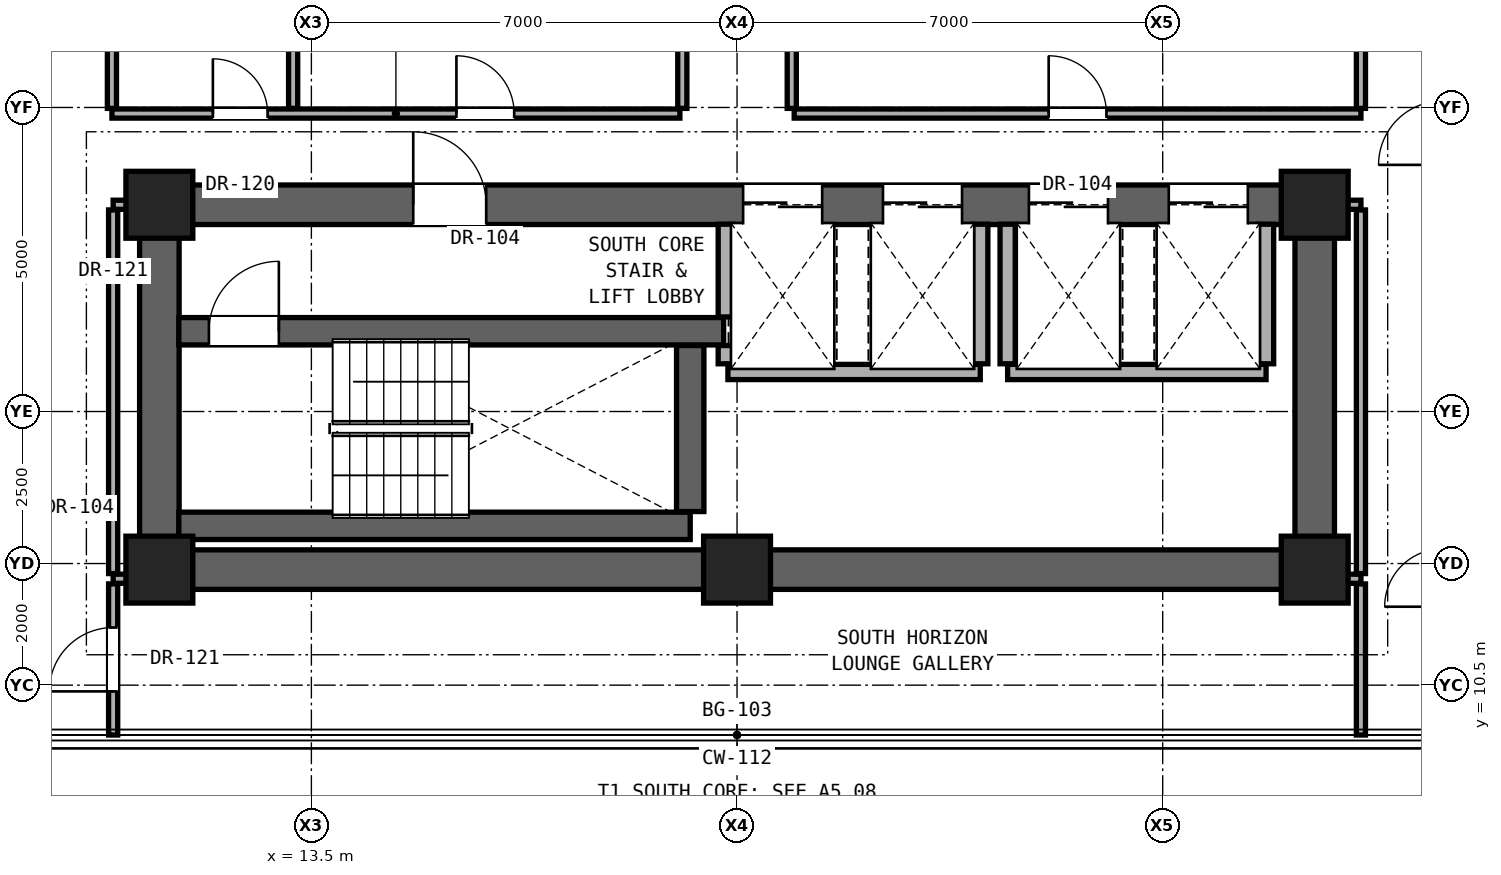
"""IFC4 building model, lengths in metres.
Left out: names, types, materials, properties, quantities, classifications, styles, units other than length and angle.
Written with IfcOpenShell. Run it as: python <this file> out.ifc"""

import sys

from ifc_helpers import new_model, si_unit, direction, frame, frame_2d, origin, origin_2d, place, context, subcontext, project, spatial, rectangle, extrude, element, fill, save


model = new_model("IFC4")
c1 = context("Model", 3, precision=1e-05, world=origin(), true_north=direction((0.0, 1.0)))
c2 = subcontext(c1, "Body", "Model", "MODEL_VIEW")
j1 = project(units=[si_unit("LENGTHUNIT", "METRE"), si_unit("PLANEANGLEUNIT", "RADIAN")], contexts=[c1])
p1 = place(None, origin())
s1 = spatial("IfcSite", under=j1, at=p1, CompositionType="ELEMENT")
p2 = place(p1, origin())
s2 = spatial("IfcBuilding", under=s1, at=p2, CompositionType="ELEMENT")
p3 = place(p2, frame((0.0, 0.0, 118.1)))
s3 = spatial("IfcBuildingStorey", under=s2, at=p3, CompositionType="ELEMENT", Elevation=118.1)
for number, where, z_axis, x_axis in (
    (1, (11.0, 12.4, 0.0), (0.0, 0.0, 1.0), (1.0, 0.0, 0.0)),
    (2, (20.5, 12.4, 0.0), (0.0, 0.0, 1.0), (1.0, 0.0, 0.0)),
    (3, (30.0, 12.4, 0.0), (0.0, 0.0, 1.0), (1.0, 0.0, 0.0)),
    (4, (11.0, 18.4, 0.0), (0.0, 0.0, 1.0), (1.0, 0.0, 0.0)),
    (5, (30.0, 18.4, 0.0), (0.0, 0.0, 1.0), (1.0, 0.0, 0.0)),
):
    element("IfcColumn", number, at=place(p3, frame(where, z_axis=z_axis, x_axis=x_axis)), inside=s3, PredefinedType="COLUMN", context=c2, shape_type="SweptSolid", body=[
        extrude(rectangle(XDim=1.1, YDim=1.1, at=origin_2d()), origin(), (0.0, 0.0, 1.0), 3.3),
    ])
p4 = place(p3, frame((11.0, 12.4, 0.0), z_axis=(0.0, 0.0, 1.0), x_axis=(1.0, 0.0, 0.0)))
e6 = element("IfcWall", 6, at=p4, inside=s3, PredefinedType="SHEAR", context=c2, shape_type="SweptSolid", body=[
    extrude(rectangle(XDim=19.0, YDim=0.65, at=frame_2d((9.5, 0.0))), origin(), (0.0, 0.0, 1.0), 3.08),
])
for number, where, z_axis, x_axis in (
    (7, (11.0, 12.4, 0.0), (0.0, 0.0, 1.0), (0.0, 1.0, 0.0)),
    (8, (30.0, 12.4, 0.0), (0.0, 0.0, 1.0), (0.0, 1.0, 0.0)),
):
    element("IfcWall", number, at=place(p3, frame(where, z_axis=z_axis, x_axis=x_axis)), inside=s3, PredefinedType="SHEAR", context=c2, shape_type="SweptSolid", body=[
        extrude(rectangle(XDim=6.0, YDim=0.65, at=frame_2d((3.0, 0.0))), origin(), (0.0, 0.0, 1.0), 3.08),
    ])
p5 = place(p3, frame((11.0, 18.4, 0.0), z_axis=(0.0, 0.0, 1.0), x_axis=(1.0, 0.0, 0.0)))
e9 = element("IfcWall", 9, at=p5, inside=s3, PredefinedType="SHEAR", context=c2, shape_type="SweptSolid", body=[
    extrude(rectangle(XDim=19.0, YDim=0.65, at=frame_2d((9.5, 0.0))), origin(), (0.0, 0.0, 1.0), 3.08),
])
p6 = place(p5, frame((4.175, 0.0, 0.0)))
e10 = element("IfcOpeningElement", 10, at=p6, cuts=e9, PredefinedType="OPENING", context=c2, shape_type="SweptSolid", body=[
    extrude(rectangle(XDim=1.2, YDim=2.25, at=frame_2d((0.6, 1.125))), frame((0.0, 0.335, 0.0), z_axis=(0.0, -1.0, 0.0), x_axis=(1.0, 0.0, 0.0)), (0.0, 0.0, 1.0), 0.67),
])
p7 = place(p5, frame((9.6, 0.0, 0.0)))
e11 = element("IfcOpeningElement", 11, at=p7, cuts=e9, PredefinedType="OPENING", context=c2, shape_type="SweptSolid", body=[
    extrude(rectangle(XDim=1.3, YDim=2.3, at=frame_2d((0.65, 1.15))), frame((0.0, 0.335, 0.0), z_axis=(0.0, -1.0, 0.0), x_axis=(1.0, 0.0, 0.0)), (0.0, 0.0, 1.0), 0.67),
])
p8 = place(p5, frame((11.9, 0.0, 0.0)))
e12 = element("IfcOpeningElement", 12, at=p8, cuts=e9, PredefinedType="OPENING", context=c2, shape_type="SweptSolid", body=[
    extrude(rectangle(XDim=1.3, YDim=2.3, at=frame_2d((0.65, 1.15))), frame((0.0, 0.335, 0.0), z_axis=(0.0, -1.0, 0.0), x_axis=(1.0, 0.0, 0.0)), (0.0, 0.0, 1.0), 0.67),
])
p9 = place(p5, frame((14.3, 0.0, 0.0)))
e13 = element("IfcOpeningElement", 13, at=p9, cuts=e9, PredefinedType="OPENING", context=c2, shape_type="SweptSolid", body=[
    extrude(rectangle(XDim=1.3, YDim=2.3, at=frame_2d((0.65, 1.15))), frame((0.0, 0.335, 0.0), z_axis=(0.0, -1.0, 0.0), x_axis=(1.0, 0.0, 0.0)), (0.0, 0.0, 1.0), 0.67),
])
p10 = place(p5, frame((16.6, 0.0, 0.0)))
e14 = element("IfcOpeningElement", 14, at=p10, cuts=e9, PredefinedType="OPENING", context=c2, shape_type="SweptSolid", body=[
    extrude(rectangle(XDim=1.3, YDim=2.3, at=frame_2d((0.65, 1.15))), frame((0.0, 0.335, 0.0), z_axis=(0.0, -1.0, 0.0), x_axis=(1.0, 0.0, 0.0)), (0.0, 0.0, 1.0), 0.67),
])
for number, where, z_axis, x_axis in (
    (15, (10.24, 12.25, 0.0), (0.0, 0.0, 1.0), (1.0, 0.0, 0.0)),
    (16, (30.32, 12.25, 0.0), (0.0, 0.0, 1.0), (1.0, 0.0, 0.0)),
):
    element("IfcWall", number, at=place(p3, frame(where, z_axis=z_axis, x_axis=x_axis)), inside=s3, PredefinedType="PARTITIONING", context=c2, shape_type="SweptSolid", body=[
        extrude(rectangle(XDim=0.44, YDim=0.15, at=frame_2d((0.22, 0.0))), origin(), (0.0, 0.0, 1.0), 3.08),
    ])
p11 = place(p3, frame((11.32, 13.12, 0.0), z_axis=(0.0, 0.0, 1.0), x_axis=(1.0, 0.0, 0.0)))
e17 = element("IfcWall", 17, at=p11, inside=s3, PredefinedType="SHEAR", context=c2, shape_type="SweptSolid", body=[
    extrude(rectangle(XDim=8.41, YDim=0.45, at=frame_2d((4.205, 0.0))), origin(), (0.0, 0.0, 1.0), 3.08),
])
p12 = place(p3, frame((20.35, 15.65, 0.0), z_axis=(0.0, 0.0, 1.0), x_axis=(1.0, 0.0, 0.0)))
e18 = element("IfcWall", 18, at=p12, inside=s3, PredefinedType="SOLIDWALL", context=c2, shape_type="SweptSolid", body=[
    extrude(rectangle(XDim=4.15, YDim=0.25, at=frame_2d((2.075, 0.0))), origin(), (0.0, 0.0, 1.0), 3.08),
])
p13 = place(p3, frame((24.95, 15.65, 0.0), z_axis=(0.0, 0.0, 1.0), x_axis=(1.0, 0.0, 0.0)))
e19 = element("IfcWall", 19, at=p13, inside=s3, PredefinedType="SOLIDWALL", context=c2, shape_type="SweptSolid", body=[
    extrude(rectangle(XDim=4.25, YDim=0.25, at=frame_2d((2.125, 0.0))), origin(), (0.0, 0.0, 1.0), 3.08),
])
p14 = place(p3, frame((11.32, 16.32, 0.0), z_axis=(0.0, 0.0, 1.0), x_axis=(1.0, 0.0, 0.0)))
e20 = element("IfcWall", 20, at=p14, inside=s3, PredefinedType="SHEAR", context=c2, shape_type="SweptSolid", body=[
    extrude(rectangle(XDim=8.96, YDim=0.45, at=frame_2d((4.48, 0.0))), origin(), (0.0, 0.0, 1.0), 3.08),
])
p15 = place(p14, frame((0.495, 0.0, 0.0)))
e21 = element("IfcOpeningElement", 21, at=p15, cuts=e20, PredefinedType="OPENING", context=c2, shape_type="SweptSolid", body=[
    extrude(rectangle(XDim=1.15, YDim=2.2, at=frame_2d((0.575, 1.1))), frame((0.0, 0.235, 0.0), z_axis=(0.0, -1.0, 0.0), x_axis=(1.0, 0.0, 0.0)), (0.0, 0.0, 1.0), 0.47),
])
for number, where, z_axis, x_axis in (
    (22, (10.24, 18.4, 0.0), (0.0, 0.0, 1.0), (1.0, 0.0, 0.0)),
    (23, (30.32, 18.4, 0.0), (0.0, 0.0, 1.0), (1.0, 0.0, 0.0)),
):
    element("IfcWall", number, at=place(p3, frame(where, z_axis=z_axis, x_axis=x_axis)), inside=s3, PredefinedType="PARTITIONING", context=c2, shape_type="SweptSolid", body=[
        extrude(rectangle(XDim=0.44, YDim=0.15, at=frame_2d((0.22, 0.0))), origin(), (0.0, 0.0, 1.0), 2.456),
    ])
p16 = place(p3, frame((10.22, 19.9, 0.0), z_axis=(0.0, 0.0, 1.0), x_axis=(1.0, 0.0, 0.0)))
e24 = element("IfcWall", 24, at=p16, inside=s3, PredefinedType="PARTITIONING", context=c2, shape_type="SweptSolid", body=[
    extrude(rectangle(XDim=9.34, YDim=0.15, at=frame_2d((4.67, 0.0))), origin(), (0.0, 0.0, 1.0), 2.216),
])
p17 = place(p16, frame((1.66, 0.0, 0.0)))
e25 = element("IfcOpeningElement", 25, at=p17, cuts=e24, PredefinedType="OPENING", context=c2, shape_type="SweptSolid", body=[
    extrude(rectangle(XDim=0.9, YDim=2.1, at=frame_2d((0.45, 1.05))), frame((0.0, 0.085, 0.0), z_axis=(0.0, -1.0, 0.0), x_axis=(1.0, 0.0, 0.0)), (0.0, 0.0, 1.0), 0.17),
])
p18 = place(p16, frame((5.665, 0.0, 0.0)))
e26 = element("IfcOpeningElement", 26, at=p18, cuts=e24, PredefinedType="OPENING", context=c2, shape_type="SweptSolid", body=[
    extrude(rectangle(XDim=0.95, YDim=2.15, at=frame_2d((0.475, 1.075))), frame((0.0, 0.085, 0.0), z_axis=(0.0, -1.0, 0.0), x_axis=(1.0, 0.0, 0.0)), (0.0, 0.0, 1.0), 0.17),
])
p19 = place(p3, frame((21.44, 19.9, 0.0), z_axis=(0.0, 0.0, 1.0), x_axis=(1.0, 0.0, 0.0)))
e27 = element("IfcWall", 27, at=p19, inside=s3, PredefinedType="PARTITIONING", context=c2, shape_type="SweptSolid", body=[
    extrude(rectangle(XDim=9.32, YDim=0.15, at=frame_2d((4.66, 0.0))), origin(), (0.0, 0.0, 1.0), 2.216),
])
p20 = place(p19, frame((4.185, 0.0, 0.0)))
e28 = element("IfcOpeningElement", 28, at=p20, cuts=e27, PredefinedType="OPENING", context=c2, shape_type="SweptSolid", body=[
    extrude(rectangle(XDim=0.95, YDim=2.15, at=frame_2d((0.475, 1.075))), frame((0.0, 0.085, 0.0), z_axis=(0.0, -1.0, 0.0), x_axis=(1.0, 0.0, 0.0)), (0.0, 0.0, 1.0), 0.17),
])
p21 = place(p3, frame((10.22, 19.985, 0.0), z_axis=(0.0, 0.0, 1.0), x_axis=(0.0, 1.0, 0.0)))
e29 = element("IfcWall", 29, at=p21, inside=s3, PredefinedType="PARTITIONING", context=c2, shape_type="SweptSolid", body=[
    extrude(rectangle(XDim=2.78, YDim=0.15, at=frame_2d((1.39, 0.0))), origin(), (0.0, 0.0, 1.0), 3.08),
])
p22 = place(p3, frame((10.24, 9.68, 0.0), z_axis=(0.0, 0.0, 1.0), x_axis=(0.0, 1.0, 0.0)))
e30 = element("IfcWall", 30, at=p22, inside=s3, PredefinedType="PARTITIONING", context=c2, shape_type="SweptSolid", body=[
    extrude(rectangle(XDim=2.485, YDim=0.15, at=frame_2d((1.243, 0.0))), origin(), (0.0, 0.0, 1.0), 3.08),
])
p23 = place(p22, frame((0.718, 0.0, 0.0)))
e31 = element("IfcOpeningElement", 31, at=p23, cuts=e30, PredefinedType="OPENING", context=c2, shape_type="SweptSolid", body=[
    extrude(rectangle(XDim=1.05, YDim=2.2, at=frame_2d((0.525, 1.1))), frame((0.0, 0.085, 0.0), z_axis=(0.0, -1.0, 0.0), x_axis=(1.0, 0.0, 0.0)), (0.0, 0.0, 1.0), 0.17),
])
p24 = place(p3, frame((10.24, 12.335, 0.0), z_axis=(0.0, 0.0, 1.0), x_axis=(0.0, 1.0, 0.0)))
e32 = element("IfcWall", 32, at=p24, inside=s3, PredefinedType="PARTITIONING", context=c2, shape_type="SweptSolid", body=[
    extrude(rectangle(XDim=5.98, YDim=0.15, at=frame_2d((2.99, 0.0))), origin(), (0.0, 0.0, 1.0), 2.456),
])
p25 = place(p3, frame((13.2, 19.985, 0.0), z_axis=(0.0, 0.0, 1.0), x_axis=(0.0, 1.0, 0.0)))
e33 = element("IfcWall", 33, at=p25, inside=s3, PredefinedType="PARTITIONING", context=c2, shape_type="SweptSolid", body=[
    extrude(rectangle(XDim=2.78, YDim=0.15, at=frame_2d((1.39, 0.0))), origin(), (0.0, 0.0, 1.0), 3.08),
])
p26 = place(p3, frame((19.6, 19.985, 0.0), z_axis=(0.0, 0.0, 1.0), x_axis=(0.0, 1.0, 0.0)))
e34 = element("IfcWall", 34, at=p26, inside=s3, PredefinedType="PARTITIONING", context=c2, shape_type="SweptSolid", body=[
    extrude(rectangle(XDim=5.53, YDim=0.15, at=frame_2d((2.765, 0.0))), origin(), (0.0, 0.0, 1.0), 2.216),
])
p27 = place(p3, frame((19.73, 13.355, 0.0), z_axis=(0.0, 0.0, 1.0), x_axis=(0.0, 1.0, 0.0)))
e35 = element("IfcWall", 35, at=p27, inside=s3, PredefinedType="SHEAR", context=c2, shape_type="SweptSolid", body=[
    extrude(rectangle(XDim=2.73, YDim=0.45, at=frame_2d((1.365, 0.0))), origin(), (0.0, 0.0, 1.0), 3.08),
])
p28 = place(p3, frame((20.315, 15.785, 0.0), z_axis=(0.0, 0.0, 1.0), x_axis=(0.0, 1.0, 0.0)))
e36 = element("IfcWall", 36, at=p28, inside=s3, PredefinedType="SOLIDWALL", context=c2, shape_type="SweptSolid", body=[
    extrude(rectangle(XDim=0.3, YDim=0.25, at=frame_2d((0.15, 0.0))), origin(), (0.0, 0.0, 1.0), 3.08),
])
p29 = place(p3, frame((20.315, 16.555, 0.0), z_axis=(0.0, 0.0, 1.0), x_axis=(0.0, 1.0, 0.0)))
e37 = element("IfcWall", 37, at=p29, inside=s3, PredefinedType="SOLIDWALL", context=c2, shape_type="SweptSolid", body=[
    extrude(rectangle(XDim=1.525, YDim=0.25, at=frame_2d((0.763, 0.0))), origin(), (0.0, 0.0, 1.0), 3.08),
])
p30 = place(p3, frame((21.4, 19.985, 0.0), z_axis=(0.0, 0.0, 1.0), x_axis=(0.0, 1.0, 0.0)))
e38 = element("IfcWall", 38, at=p30, inside=s3, PredefinedType="PARTITIONING", context=c2, shape_type="SweptSolid", body=[
    extrude(rectangle(XDim=5.53, YDim=0.15, at=frame_2d((2.765, 0.0))), origin(), (0.0, 0.0, 1.0), 2.216),
])
for number, where, z_axis, x_axis in (
    (39, (24.5, 15.785, 0.0), (0.0, 0.0, 1.0), (0.0, 1.0, 0.0)),
    (40, (24.95, 15.785, 0.0), (0.0, 0.0, 1.0), (0.0, 1.0, 0.0)),
    (41, (29.2, 15.785, 0.0), (0.0, 0.0, 1.0), (0.0, 1.0, 0.0)),
):
    element("IfcWall", number, at=place(p3, frame(where, z_axis=z_axis, x_axis=x_axis)), inside=s3, PredefinedType="SOLIDWALL", context=c2, shape_type="SweptSolid", body=[
        extrude(rectangle(XDim=2.295, YDim=0.25, at=frame_2d((1.147, 0.0))), origin(), (0.0, 0.0, 1.0), 3.08),
    ])
p31 = place(p3, frame((30.76, 9.68, 0.0), z_axis=(0.0, 0.0, 1.0), x_axis=(0.0, 1.0, 0.0)))
e42 = element("IfcWall", 42, at=p31, inside=s3, PredefinedType="PARTITIONING", context=c2, shape_type="SweptSolid", body=[
    extrude(rectangle(XDim=2.485, YDim=0.15, at=frame_2d((1.243, 0.0))), origin(), (0.0, 0.0, 1.0), 3.08),
])
p32 = place(p3, frame((30.76, 12.335, 0.0), z_axis=(0.0, 0.0, 1.0), x_axis=(0.0, 1.0, 0.0)))
e43 = element("IfcWall", 43, at=p32, inside=s3, PredefinedType="PARTITIONING", context=c2, shape_type="SweptSolid", body=[
    extrude(rectangle(XDim=5.98, YDim=0.15, at=frame_2d((2.99, 0.0))), origin(), (0.0, 0.0, 1.0), 2.456),
])
p33 = place(p3, frame((30.76, 19.985, 0.0), z_axis=(0.0, 0.0, 1.0), x_axis=(0.0, 1.0, 0.0)))
e44 = element("IfcWall", 44, at=p33, inside=s3, PredefinedType="PARTITIONING", context=c2, shape_type="SweptSolid", body=[
    extrude(rectangle(XDim=5.53, YDim=0.15, at=frame_2d((2.765, 0.0))), origin(), (0.0, 0.0, 1.0), 2.299),
])
p34 = place(p6, origin())
e45 = element("IfcDoor", 45, at=p34, inside=s3, OperationType="SINGLE_SWING_LEFT", PredefinedType="DOOR", context=c2, shape_type="SweptSolid", body=[
    extrude(rectangle(XDim=1.2, YDim=2.25, at=frame_2d((0.6, 1.125))), frame((0.0, 0.025, 0.0), z_axis=(0.0, -1.0, 0.0), x_axis=(1.0, 0.0, 0.0)), (0.0, 0.0, 1.0), 0.05),
])
fill(e10, e45)
p35 = place(p15, origin())
e46 = element("IfcDoor", 46, at=p35, inside=s3, OperationType="SINGLE_SWING_RIGHT", PredefinedType="DOOR", context=c2, shape_type="SweptSolid", body=[
    extrude(rectangle(XDim=1.15, YDim=2.2, at=frame_2d((0.575, 1.1))), frame((0.0, 0.025, 0.0), z_axis=(0.0, -1.0, 0.0), x_axis=(1.0, 0.0, 0.0)), (0.0, 0.0, 1.0), 0.05),
])
fill(e21, e46)
p36 = place(p17, origin())
e47 = element("IfcDoor", 47, at=p36, inside=s3, OperationType="SINGLE_SWING_LEFT", PredefinedType="DOOR", context=c2, shape_type="SweptSolid", body=[
    extrude(rectangle(XDim=0.9, YDim=2.1, at=frame_2d((0.45, 1.05))), frame((0.0, 0.025, 0.0), z_axis=(0.0, -1.0, 0.0), x_axis=(1.0, 0.0, 0.0)), (0.0, 0.0, 1.0), 0.05),
])
fill(e25, e47)
p37 = place(p18, origin())
e48 = element("IfcDoor", 48, at=p37, inside=s3, OperationType="SINGLE_SWING_LEFT", PredefinedType="DOOR", context=c2, shape_type="SweptSolid", body=[
    extrude(rectangle(XDim=0.95, YDim=2.15, at=frame_2d((0.475, 1.075))), frame((0.0, 0.025, 0.0), z_axis=(0.0, -1.0, 0.0), x_axis=(1.0, 0.0, 0.0)), (0.0, 0.0, 1.0), 0.05),
])
fill(e26, e48)
p38 = place(p20, origin())
e49 = element("IfcDoor", 49, at=p38, inside=s3, OperationType="SINGLE_SWING_LEFT", PredefinedType="DOOR", context=c2, shape_type="SweptSolid", body=[
    extrude(rectangle(XDim=0.95, YDim=2.15, at=frame_2d((0.475, 1.075))), frame((0.0, 0.025, 0.0), z_axis=(0.0, -1.0, 0.0), x_axis=(1.0, 0.0, 0.0)), (0.0, 0.0, 1.0), 0.05),
])
fill(e28, e49)
p39 = place(p23, origin())
e50 = element("IfcDoor", 50, at=p39, inside=s3, OperationType="SINGLE_SWING_LEFT", PredefinedType="DOOR", context=c2, shape_type="SweptSolid", body=[
    extrude(rectangle(XDim=1.05, YDim=2.2, at=frame_2d((0.525, 1.1))), frame((0.0, 0.025, 0.0), z_axis=(0.0, -1.0, 0.0), x_axis=(1.0, 0.0, 0.0)), (0.0, 0.0, 1.0), 0.05),
])
fill(e31, e50)
p40 = place(p7, origin())
e51 = element("IfcDoor", 51, at=p40, inside=s3, OperationType="DOUBLE_DOOR_SLIDING", PredefinedType="DOOR", context=c2, shape_type="SweptSolid", body=[
    extrude(rectangle(XDim=1.3, YDim=2.3, at=frame_2d((0.65, 1.15))), frame((0.0, 0.025, 0.0), z_axis=(0.0, -1.0, 0.0), x_axis=(1.0, 0.0, 0.0)), (0.0, 0.0, 1.0), 0.05),
])
fill(e11, e51)
p41 = place(p8, origin())
e52 = element("IfcDoor", 52, at=p41, inside=s3, OperationType="DOUBLE_DOOR_SLIDING", PredefinedType="DOOR", context=c2, shape_type="SweptSolid", body=[
    extrude(rectangle(XDim=1.3, YDim=2.3, at=frame_2d((0.65, 1.15))), frame((0.0, 0.025, 0.0), z_axis=(0.0, -1.0, 0.0), x_axis=(1.0, 0.0, 0.0)), (0.0, 0.0, 1.0), 0.05),
])
fill(e12, e52)
p42 = place(p9, origin())
e53 = element("IfcDoor", 53, at=p42, inside=s3, OperationType="DOUBLE_DOOR_SLIDING", PredefinedType="DOOR", context=c2, shape_type="SweptSolid", body=[
    extrude(rectangle(XDim=1.3, YDim=2.3, at=frame_2d((0.65, 1.15))), frame((0.0, 0.025, 0.0), z_axis=(0.0, -1.0, 0.0), x_axis=(1.0, 0.0, 0.0)), (0.0, 0.0, 1.0), 0.05),
])
fill(e13, e53)
p43 = place(p10, origin())
e54 = element("IfcDoor", 54, at=p43, inside=s3, OperationType="DOUBLE_DOOR_SLIDING", PredefinedType="DOOR", context=c2, shape_type="SweptSolid", body=[
    extrude(rectangle(XDim=1.3, YDim=2.3, at=frame_2d((0.65, 1.15))), frame((0.0, 0.025, 0.0), z_axis=(0.0, -1.0, 0.0), x_axis=(1.0, 0.0, 0.0)), (0.0, 0.0, 1.0), 0.05),
])
fill(e14, e54)
save(model, sys.argv[1])
